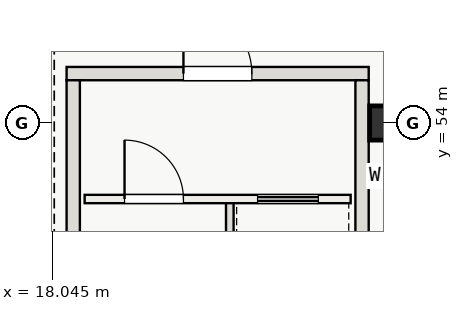
"""IFC4 building model, lengths in metres.
Left out: names, types, materials, properties, quantities, classifications, styles, units other than length and angle.
Written with IfcOpenShell. Run it as: python <this file> out.ifc"""

import sys

from ifc_helpers import new_model, si_unit, direction, frame, frame_2d, origin, origin_2d, place, context, subcontext, project, spatial, rectangle, extrude, element, fill, save


model = new_model("IFC4")
c1 = context("Model", 3, precision=1e-05, world=origin(), true_north=direction((0.0, 1.0)))
c2 = subcontext(c1, "Body", "Model", "MODEL_VIEW")
j1 = project(units=[si_unit("LENGTHUNIT", "METRE"), si_unit("PLANEANGLEUNIT", "RADIAN")], contexts=[c1])
p1 = place(None, origin())
s1 = spatial("IfcSite", under=j1, at=p1, CompositionType="ELEMENT")
p2 = place(p1, origin())
s2 = spatial("IfcBuilding", under=s1, at=p2, CompositionType="ELEMENT")
p3 = place(p2, frame((0.0, 0.0, 12.0)))
s3 = spatial("IfcBuildingStorey", under=s2, at=p3, CompositionType="ELEMENT", Elevation=12.0)
p4 = place(p3, frame((18.425, 55.3, 0.0), z_axis=(0.0, 0.0, 1.0), x_axis=(1.0, 0.0, 0.0)))
e1 = element("IfcWall", 1, at=p4, inside=s3, PredefinedType="SHEAR", context=c2, shape_type="SweptSolid", body=[
    extrude(rectangle(XDim=7.95, YDim=0.35, at=frame_2d((3.975, 0.0))), origin(), (0.0, 0.0, 1.0), 4.8),
])
p5 = place(p4, frame((3.075, 0.0, 0.0)))
e2 = element("IfcOpeningElement", 2, at=p5, cuts=e1, PredefinedType="OPENING", context=c2, shape_type="SweptSolid", body=[
    extrude(rectangle(XDim=1.8, YDim=2.3, at=frame_2d((0.9, 1.15))), frame((0.0, 0.185, 0.0), z_axis=(0.0, -1.0, 0.0), x_axis=(1.0, 0.0, 0.0)), (0.0, 0.0, 1.0), 0.37),
])
for number, where, z_axis, x_axis in (
    (3, (18.6, 43.875, 0.0), (0.0, 0.0, 1.0), (0.0, 1.0, 0.0)),
    (4, (26.2, 43.875, 0.0), (0.0, 0.0, 1.0), (0.0, 1.0, 0.0)),
):
    element("IfcWall", number, at=place(p3, frame(where, z_axis=z_axis, x_axis=x_axis)), inside=s3, PredefinedType="SHEAR", context=c2, shape_type="SweptSolid", body=[
        extrude(rectangle(XDim=11.25, YDim=0.35, at=frame_2d((5.625, 0.0))), origin(), (0.0, 0.0, 1.0), 4.8),
    ])
p6 = place(p3, frame((27.0, 54.0, 0.0), z_axis=(0.0, 0.0, 1.0), x_axis=(1.0, 0.0, 0.0)))
e5 = element("IfcColumn", 5, at=p6, inside=s3, PredefinedType="COLUMN", context=c2, shape_type="SweptSolid", body=[
    extrude(rectangle(XDim=1.2, YDim=0.9, at=origin_2d()), origin(), (0.0, 0.0, 1.0), 4.8),
])
p7 = place(p3, frame((22.72, 43.95, 0.0), z_axis=(0.0, 0.0, 1.0), x_axis=(0.0, 1.0, 0.0)))
e6 = element("IfcWall", 6, at=p7, inside=s3, PredefinedType="SOLIDWALL", context=c2, shape_type="SweptSolid", body=[
    extrude(rectangle(XDim=8.0, YDim=0.2, at=frame_2d((4.0, 0.0))), origin(), (0.0, 0.0, 1.0), 4.8),
])
p8 = place(p3, frame((18.9, 52.0, 0.0), z_axis=(0.0, 0.0, 1.0), x_axis=(1.0, 0.0, 0.0)))
e7 = element("IfcWall", 7, at=p8, inside=s3, PredefinedType="SOLIDWALL", context=c2, shape_type="SweptSolid", body=[
    extrude(rectangle(XDim=7.0, YDim=0.22, at=frame_2d((3.5, 0.0))), origin(), (0.0, 0.0, 1.0), 4.5),
])
p9 = place(p8, frame((1.05, 0.0, 0.0)))
e8 = element("IfcOpeningElement", 8, at=p9, cuts=e7, PredefinedType="OPENING", context=c2, shape_type="SweptSolid", body=[
    extrude(rectangle(XDim=1.55, YDim=2.2, at=frame_2d((0.775, 1.1))), frame((0.0, 0.12, 0.0), z_axis=(0.0, -1.0, 0.0), x_axis=(1.0, 0.0, 0.0)), (0.0, 0.0, 1.0), 0.24),
])
p10 = place(p8, frame((4.55, 0.0, 0.0)))
e9 = element("IfcOpeningElement", 9, at=p10, cuts=e7, PredefinedType="OPENING", context=c2, shape_type="SweptSolid", body=[
    extrude(rectangle(XDim=1.6, YDim=2.3, at=frame_2d((0.8, 1.15))), frame((0.0, 0.12, 0.0), z_axis=(0.0, -1.0, 0.0), x_axis=(1.0, 0.0, 0.0)), (0.0, 0.0, 1.0), 0.24),
])
p11 = place(p9, origin())
e10 = element("IfcDoor", 10, at=p11, inside=s3, OperationType="SINGLE_SWING_LEFT", PredefinedType="DOOR", context=c2, shape_type="SweptSolid", body=[
    extrude(rectangle(XDim=1.55, YDim=2.2, at=frame_2d((0.775, 1.1))), frame((0.0, 0.025, 0.0), z_axis=(0.0, -1.0, 0.0), x_axis=(1.0, 0.0, 0.0)), (0.0, 0.0, 1.0), 0.05),
])
fill(e8, e10)
p12 = place(p10, origin())
e11 = element("IfcDoor", 11, at=p12, inside=s3, OperationType="SLIDING_TO_LEFT", PredefinedType="DOOR", context=c2, shape_type="SweptSolid", body=[
    extrude(rectangle(XDim=1.6, YDim=2.3, at=frame_2d((0.8, 1.15))), frame((0.0, 0.025, 0.0), z_axis=(0.0, -1.0, 0.0), x_axis=(1.0, 0.0, 0.0)), (0.0, 0.0, 1.0), 0.05),
])
fill(e9, e11)
p13 = place(p5, origin())
e12 = element("IfcDoor", 12, at=p13, inside=s3, OperationType="DOUBLE_DOOR_SINGLE_SWING", PredefinedType="DOOR", context=c2, shape_type="SweptSolid", body=[
    extrude(rectangle(XDim=1.8, YDim=2.3, at=frame_2d((0.9, 1.15))), frame((0.0, 0.025, 0.0), z_axis=(0.0, -1.0, 0.0), x_axis=(1.0, 0.0, 0.0)), (0.0, 0.0, 1.0), 0.05),
])
fill(e2, e12)
save(model, sys.argv[1])
